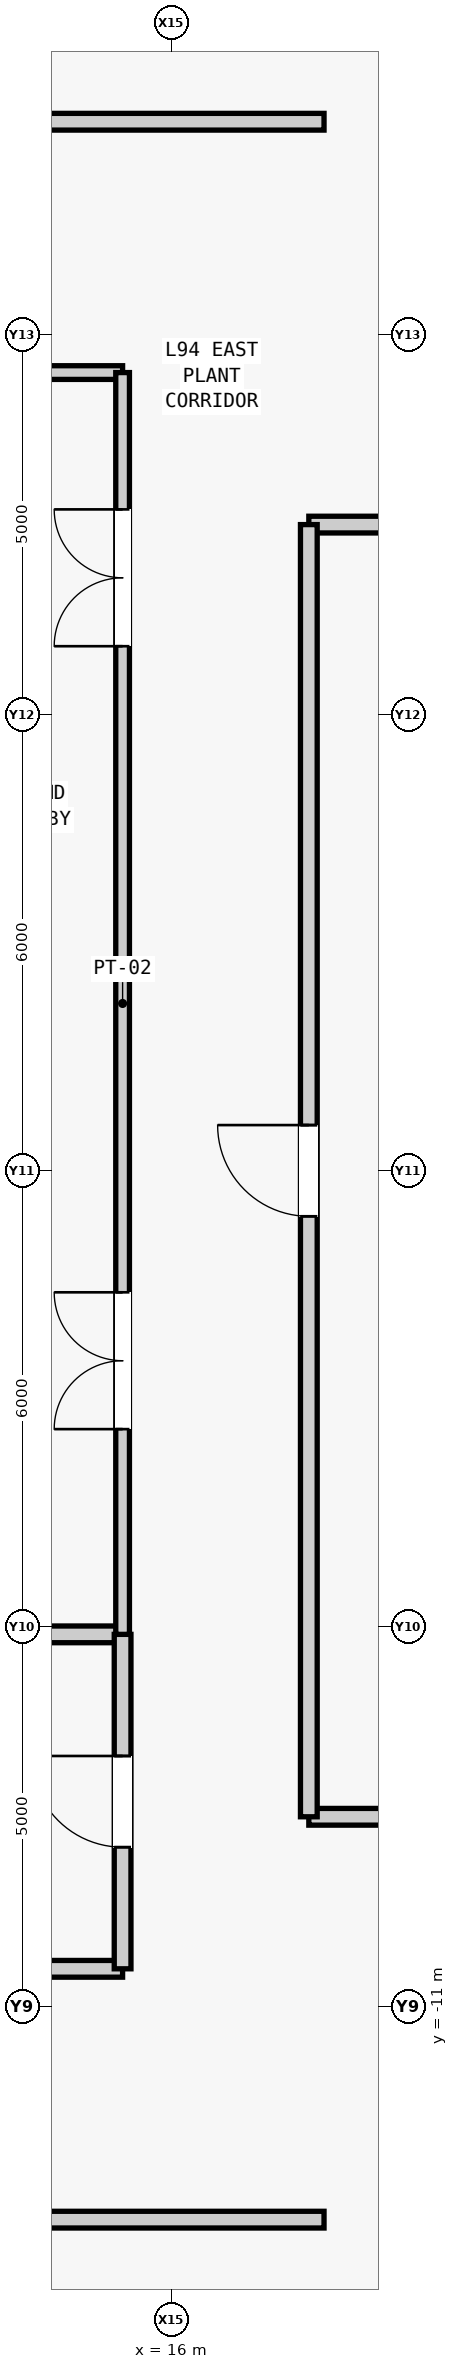
"""IFC4 building model, lengths in metres.
Left out: names, types, materials, properties, quantities, classifications, styles, units other than length and angle.
Written with IfcOpenShell. Run it as: python <this file> out.ifc"""

import sys

from ifc_helpers import new_model, si_unit, direction, frame, frame_2d, origin, place, context, subcontext, project, spatial, rectangle, extrude, source, transform, mapped, element, fill, save


model = new_model("IFC4")
c1 = context("Model", 3, precision=1e-05, world=origin(), true_north=direction((0.0, 1.0)))
c2 = subcontext(c1, "Body", "Model", "MODEL_VIEW")
j1 = project(units=[si_unit("LENGTHUNIT", "METRE"), si_unit("PLANEANGLEUNIT", "RADIAN")], contexts=[c1])
p1 = place(None, origin())
s1 = spatial("IfcSite", under=j1, at=p1, CompositionType="ELEMENT")
p2 = place(p1, origin())
s2 = spatial("IfcBuilding", under=s1, at=p2, CompositionType="ELEMENT")
p3 = place(p2, frame((0.0, 0.0, 399.5)))
s3 = spatial("IfcBuildingStorey", under=s2, at=p3, CompositionType="ELEMENT", Elevation=399.5)
m1 = source(origin(), c2, "Body", "SweptSolid", [
    extrude(rectangle(XDim=4.05, YDim=0.22, at=frame_2d((2.025, 0.0))), origin(), (0.0, 0.0, 1.0), 4.5),
])
p4 = place(p3, frame((11.3, -10.5, 0.0), z_axis=(0.0, 0.0, 1.0), x_axis=(1.0, 0.0, 0.0)))
e1 = element("IfcWall", 1, at=p4, inside=s3, PredefinedType="PARTITIONING", context=c2, shape_type="MappedRepresentation", body=[
    mapped(m1, transform((0.0, 0.0, 0.0), scale=1.0)),
])
m2 = source(origin(), c2, "Body", "SweptSolid", [
    extrude(rectangle(XDim=4.05, YDim=0.22, at=frame_2d((2.025, 0.0))), origin(), (0.0, 0.0, 1.0), 3.951),
])
p5 = place(p3, frame((11.3, -6.1, 0.0), z_axis=(0.0, 0.0, 1.0), x_axis=(1.0, 0.0, 0.0)))
e2 = element("IfcWall", 2, at=p5, inside=s3, PredefinedType="PARTITIONING", context=c2, shape_type="MappedRepresentation", body=[
    mapped(m2, transform((0.0, 0.0, 0.0), scale=1.0)),
])
m3 = source(origin(), c2, "Body", "SweptSolid", [
    extrude(rectangle(XDim=4.4, YDim=0.22, at=frame_2d((2.2, 0.0))), origin(), (0.0, 0.0, 1.0), 4.5),
])
p6 = place(p3, frame((15.35, -10.5, 0.0), z_axis=(0.0, 0.0, 1.0), x_axis=(0.0, 1.0, 0.0)))
e3 = element("IfcWall", 3, at=p6, inside=s3, PredefinedType="PARTITIONING", context=c2, shape_type="MappedRepresentation", body=[
    mapped(m3, transform((0.0, 0.0, 0.0), scale=1.0)),
])
m4 = source(origin(), c2, "Body", "SweptSolid", [
    extrude(rectangle(XDim=1.2, YDim=2.2, at=frame_2d((0.6, 1.1))), frame((0.0, 0.12, 0.0), z_axis=(0.0, -1.0, 0.0), x_axis=(1.0, 0.0, 0.0)), (0.0, 0.0, 1.0), 0.24),
])
p7 = place(p6, frame((1.6, 0.0, 0.0)))
e4 = element("IfcOpeningElement", 4, at=p7, cuts=e3, PredefinedType="OPENING", context=c2, shape_type="MappedRepresentation", body=[
    mapped(m4, transform((0.0, 0.0, 0.0), scale=1.0)),
])
m5 = source(origin(), c2, "Body", "SweptSolid", [
    extrude(rectangle(XDim=4.05, YDim=0.18, at=frame_2d((2.025, 0.0))), origin(), (0.0, 0.0, 1.0), 4.5),
])
p8 = place(p3, frame((11.3, 10.5, 0.0), z_axis=(0.0, 0.0, 1.0), x_axis=(1.0, 0.0, 0.0)))
e5 = element("IfcWall", 5, at=p8, inside=s3, PredefinedType="PARTITIONING", context=c2, shape_type="MappedRepresentation", body=[
    mapped(m5, transform((0.0, 0.0, 0.0), scale=1.0)),
])
m6 = source(origin(), c2, "Body", "SweptSolid", [
    extrude(rectangle(XDim=16.6, YDim=0.18, at=frame_2d((8.3, 0.0))), origin(), (0.0, 0.0, 1.0), 4.5),
])
p9 = place(p3, frame((15.35, -6.1, 0.0), z_axis=(0.0, 0.0, 1.0), x_axis=(0.0, 1.0, 0.0)))
e6 = element("IfcWall", 6, at=p9, inside=s3, PredefinedType="PARTITIONING", context=c2, shape_type="MappedRepresentation", body=[
    mapped(m6, transform((0.0, 0.0, 0.0), scale=1.0)),
])
m7 = source(origin(), c2, "Body", "SweptSolid", [
    extrude(rectangle(XDim=1.8, YDim=2.25, at=frame_2d((0.9, 1.125))), frame((0.0, 0.1, 0.0), z_axis=(0.0, -1.0, 0.0), x_axis=(1.0, 0.0, 0.0)), (0.0, 0.0, 1.0), 0.2),
])
p10 = place(p9, frame((2.7, 0.0, 0.0)))
e7 = element("IfcOpeningElement", 7, at=p10, cuts=e6, PredefinedType="OPENING", context=c2, shape_type="MappedRepresentation", body=[
    mapped(m7, transform((0.0, 0.0, 0.0), scale=1.0)),
])
p11 = place(p9, frame((13.0, 0.0, 0.0)))
e8 = element("IfcOpeningElement", 8, at=p11, cuts=e6, PredefinedType="OPENING", context=c2, shape_type="MappedRepresentation", body=[
    mapped(m7, transform((0.0, 0.0, 0.0), scale=1.0)),
])
m8 = source(origin(), c2, "Body", "SweptSolid", [
    extrude(rectangle(XDim=36.0, YDim=0.22, at=frame_2d((18.0, 0.0))), origin(), (0.0, 0.0, 1.0), 4.5),
])
p12 = place(p3, frame((-18.0, -13.8, 0.0), z_axis=(0.0, 0.0, 1.0), x_axis=(1.0, 0.0, 0.0)))
e9 = element("IfcWall", 9, at=p12, inside=s3, PredefinedType="PARTITIONING", context=c2, shape_type="MappedRepresentation", body=[
    mapped(m8, transform((0.0, 0.0, 0.0), scale=1.0)),
])
m9 = source(origin(), c2, "Body", "SweptSolid", [
    extrude(rectangle(XDim=1.5, YDim=2.3, at=frame_2d((0.75, 1.15))), frame((0.0, 0.12, 0.0), z_axis=(0.0, -1.0, 0.0), x_axis=(1.0, 0.0, 0.0)), (0.0, 0.0, 1.0), 0.24),
])
p13 = place(p12, frame((12.4, 0.0, 0.0)))
e10 = element("IfcOpeningElement", 10, at=p13, cuts=e9, PredefinedType="OPENING", context=c2, shape_type="MappedRepresentation", body=[
    mapped(m9, transform((0.0, 0.0, 0.0), scale=1.0)),
])
p14 = place(p12, frame((25.4, 0.0, 0.0)))
e11 = element("IfcOpeningElement", 11, at=p14, cuts=e9, PredefinedType="OPENING", context=c2, shape_type="MappedRepresentation", body=[
    mapped(m9, transform((0.0, 0.0, 0.0), scale=1.0)),
])
p15 = place(p3, frame((-18.0, 13.8, 0.0), z_axis=(0.0, 0.0, 1.0), x_axis=(1.0, 0.0, 0.0)))
e12 = element("IfcWall", 12, at=p15, inside=s3, PredefinedType="PARTITIONING", context=c2, shape_type="MappedRepresentation", body=[
    mapped(m8, transform((0.0, 0.0, 0.0), scale=1.0)),
])
p16 = place(p15, frame((9.45, 0.0, 0.0)))
e13 = element("IfcOpeningElement", 13, at=p16, cuts=e12, PredefinedType="OPENING", context=c2, shape_type="MappedRepresentation", body=[
    mapped(m9, transform((0.0, 0.0, 0.0), scale=1.0)),
])
p17 = place(p15, frame((19.15, 0.0, 0.0)))
e14 = element("IfcOpeningElement", 14, at=p17, cuts=e12, PredefinedType="OPENING", context=c2, shape_type="MappedRepresentation", body=[
    mapped(m9, transform((0.0, 0.0, 0.0), scale=1.0)),
])
p18 = place(p15, frame((27.6, 0.0, 0.0)))
e15 = element("IfcOpeningElement", 15, at=p18, cuts=e12, PredefinedType="OPENING", context=c2, shape_type="MappedRepresentation", body=[
    mapped(m9, transform((0.0, 0.0, 0.0), scale=1.0)),
])
m10 = source(origin(), c2, "Body", "SweptSolid", [
    extrude(rectangle(XDim=6.2, YDim=0.22, at=frame_2d((3.1, 0.0))), origin(), (0.0, 0.0, 1.0), 4.5),
])
for number, where, z_axis, x_axis in (
    (16, (17.8, -8.5, 0.0), (0.0, 0.0, 1.0), (1.0, 0.0, 0.0)),
    (17, (17.8, 8.5, 0.0), (0.0, 0.0, 1.0), (1.0, 0.0, 0.0)),
):
    element("IfcWall", number, at=place(p3, frame(where, z_axis=z_axis, x_axis=x_axis)), inside=s3, PredefinedType="PARTITIONING", context=c2, shape_type="MappedRepresentation", body=[
        mapped(m10, transform((0.0, 0.0, 0.0), scale=1.0)),
    ])
m11 = source(origin(), c2, "Body", "SweptSolid", [
    extrude(rectangle(XDim=17.0, YDim=0.22, at=frame_2d((8.5, 0.0))), origin(), (0.0, 0.0, 1.0), 4.5),
])
p19 = place(p3, frame((17.8, -8.5, 0.0), z_axis=(0.0, 0.0, 1.0), x_axis=(0.0, 1.0, 0.0)))
e18 = element("IfcWall", 18, at=p19, inside=s3, PredefinedType="PARTITIONING", context=c2, shape_type="MappedRepresentation", body=[
    mapped(m11, transform((0.0, 0.0, 0.0), scale=1.0)),
])
p20 = place(p19, frame((7.9, 0.0, 0.0)))
e19 = element("IfcOpeningElement", 19, at=p20, cuts=e18, PredefinedType="OPENING", context=c2, shape_type="MappedRepresentation", body=[
    mapped(m4, transform((0.0, 0.0, 0.0), scale=1.0)),
])
m12 = source(origin(), c2, "Body", "SweptSolid", [
    extrude(rectangle(XDim=1.2, YDim=2.2, at=frame_2d((0.6, 1.1))), frame((0.0, 0.025, 0.0), z_axis=(0.0, -1.0, 0.0), x_axis=(1.0, 0.0, 0.0)), (0.0, 0.0, 1.0), 0.05),
])
p21 = place(p7, origin())
e20 = element("IfcDoor", 20, at=p21, inside=s3, OperationType="SINGLE_SWING_RIGHT", PredefinedType="DOOR", context=c2, shape_type="MappedRepresentation", body=[
    mapped(m12, transform((0.0, 0.0, 0.0), scale=1.0)),
])
fill(e4, e20)
m13 = source(origin(), c2, "Body", "SweptSolid", [
    extrude(rectangle(XDim=1.8, YDim=2.25, at=frame_2d((0.9, 1.125))), frame((0.0, 0.025, 0.0), z_axis=(0.0, -1.0, 0.0), x_axis=(1.0, 0.0, 0.0)), (0.0, 0.0, 1.0), 0.05),
])
p22 = place(p10, origin())
e21 = element("IfcDoor", 21, at=p22, inside=s3, OperationType="SINGLE_SWING_RIGHT", PredefinedType="DOOR", context=c2, shape_type="MappedRepresentation", body=[
    mapped(m13, transform((0.0, 0.0, 0.0), scale=1.0)),
])
fill(e7, e21)
p23 = place(p11, origin())
e22 = element("IfcDoor", 22, at=p23, inside=s3, OperationType="SINGLE_SWING_LEFT", PredefinedType="DOOR", context=c2, shape_type="MappedRepresentation", body=[
    mapped(m13, transform((0.0, 0.0, 0.0), scale=1.0)),
])
fill(e8, e22)
p24 = place(p20, origin())
e23 = element("IfcDoor", 23, at=p24, inside=s3, OperationType="SINGLE_SWING_RIGHT", PredefinedType="DOOR", context=c2, shape_type="MappedRepresentation", body=[
    mapped(m12, transform((0.0, 0.0, 0.0), scale=1.0)),
])
fill(e19, e23)
save(model, sys.argv[1])
